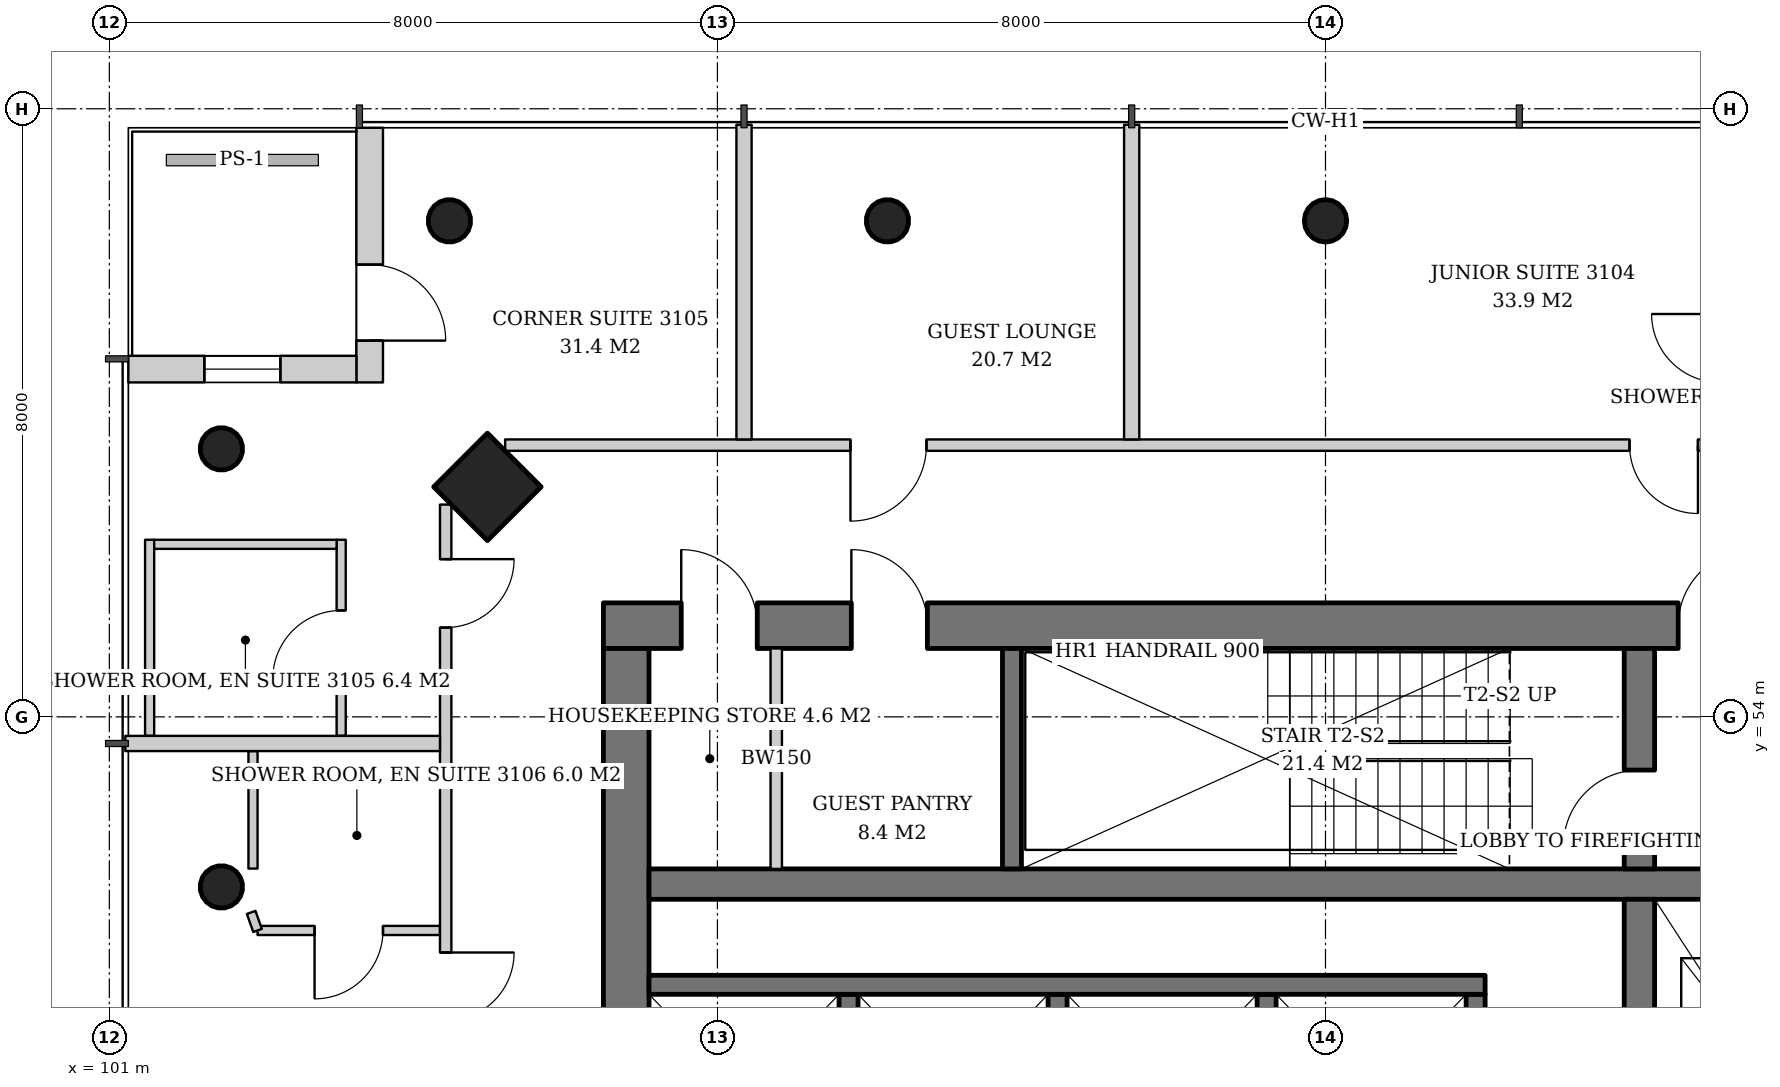
"""IFC4 building model, lengths in metres.
Left out: names, types, materials, properties, quantities, classifications, styles, units other than length and angle.
Written with IfcOpenShell. Run it as: python <this file> out.ifc"""

import sys

from ifc_helpers import new_model, si_unit, direction, frame, frame_2d, origin, origin_2d, place, context, subcontext, project, spatial, rectangle, hollow_circle, extrude, element, fill, save


model = new_model("IFC4")
c1 = context("Model", 3, precision=1e-05, world=origin(), true_north=direction((0.0, 1.0)))
c2 = subcontext(c1, "Body", "Model", "MODEL_VIEW")
j1 = project(units=[si_unit("LENGTHUNIT", "METRE"), si_unit("PLANEANGLEUNIT", "RADIAN")], contexts=[c1])
p1 = place(None, origin())
s1 = spatial("IfcSite", under=j1, at=p1, CompositionType="ELEMENT")
p2 = place(p1, origin())
s2 = spatial("IfcBuilding", under=s1, at=p2, CompositionType="ELEMENT")
p3 = place(p2, frame((0.0, 0.0, 123.6)))
s3 = spatial("IfcBuildingStorey", under=s2, at=p3, CompositionType="ELEMENT", Elevation=123.6)
p4 = place(p3, frame((105.922, 57.078, 0.0), z_axis=(0.043032401563, -0.043032401563, 0.998146494675), x_axis=(0.707106781187, 0.707106781187, 0.0)))
e1 = element("IfcColumn", 1, at=p4, inside=s3, PredefinedType="COLUMN", context=c2, shape_type="SweptSolid", body=[
    extrude(rectangle(XDim=1.0, YDim=1.0, at=origin_2d()), origin(), (0.0, 0.0, 1.0), 3.807),
])
p5 = place(p3, frame((105.422, 60.578, 0.0), z_axis=(0.043032401563, -0.043032401563, 0.998146494675), x_axis=(0.707106781187, 0.707106781187, 0.0)))
e2 = element("IfcColumn", 2, at=p5, inside=s3, PredefinedType="COLUMN", context=c2, shape_type="SweptSolid", body=[
    extrude(hollow_circle(Radius=0.28, WallThickness=0.02, at=origin_2d()), origin(), (0.0, 0.0, 1.0), 3.807),
])
p6 = place(p3, frame((117.0, 60.578, 0.0), z_axis=(0.0, -0.043072300418, 0.999071957837), x_axis=(1.0, 0.0, 0.0)))
e3 = element("IfcColumn", 3, at=p6, inside=s3, PredefinedType="COLUMN", context=c2, shape_type="SweptSolid", body=[
    extrude(hollow_circle(Radius=0.28, WallThickness=0.02, at=origin_2d()), origin(), (0.0, 0.0, 1.0), 3.803),
])
p7 = place(p3, frame((111.211, 60.578, 0.0), z_axis=(0.021563230905, -0.043062285527, 0.998839660125), x_axis=(0.894160516368, 0.44774654769, 0.0)))
e4 = element("IfcColumn", 4, at=p7, inside=s3, PredefinedType="COLUMN", context=c2, shape_type="SweptSolid", body=[
    extrude(hollow_circle(Radius=0.28, WallThickness=0.02, at=origin_2d()), origin(), (0.0, 0.0, 1.0), 3.804),
])
p8 = place(p3, frame((102.422, 57.578, 0.0), z_axis=(0.043032401563, -0.043032401563, 0.998146494675), x_axis=(0.707106781187, 0.707106781187, 0.0)))
e5 = element("IfcColumn", 5, at=p8, inside=s3, PredefinedType="COLUMN", context=c2, shape_type="SweptSolid", body=[
    extrude(hollow_circle(Radius=0.28, WallThickness=0.02, at=origin_2d()), origin(), (0.0, 0.0, 1.0), 3.807),
])
p9 = place(p3, frame((102.422, 51.789, 0.0), z_axis=(0.043062285527, -0.021563230905, 0.998839660125), x_axis=(0.44774654769, 0.894160516368, 0.0)))
e6 = element("IfcColumn", 6, at=p9, inside=s3, PredefinedType="COLUMN", context=c2, shape_type="SweptSolid", body=[
    extrude(hollow_circle(Radius=0.28, WallThickness=0.02, at=origin_2d()), origin(), (0.0, 0.0, 1.0), 3.804),
])
p10 = place(p3, frame((107.5, 55.2, 0.0), z_axis=(0.0, 0.0, 1.0), x_axis=(1.0, 0.0, 0.0)))
e7 = element("IfcWall", 7, at=p10, inside=s3, PredefinedType="SHEAR", context=c2, shape_type="SweptSolid", body=[
    extrude(rectangle(XDim=19.0, YDim=0.6, at=frame_2d((9.5, 0.0))), origin(), (0.0, 0.0, 1.0), 3.8),
])
p11 = place(p10, frame((14.14, 0.0, 0.0)))
e8 = element("IfcOpeningElement", 8, at=p11, cuts=e7, PredefinedType="OPENING", context=c2, shape_type="SweptSolid", body=[
    extrude(rectangle(XDim=1.0, YDim=2.1, at=frame_2d((0.5, 1.05))), frame((0.0, 0.31, 0.0), z_axis=(0.0, -1.0, 0.0), x_axis=(1.0, 0.0, 0.0)), (0.0, 0.0, 1.0), 0.62),
])
p12 = place(p10, frame((1.024, 0.0, 0.0)))
e9 = element("IfcOpeningElement", 9, at=p12, cuts=e7, PredefinedType="OPENING", context=c2, shape_type="SweptSolid", body=[
    extrude(rectangle(XDim=1.0, YDim=2.1, at=frame_2d((0.5, 1.05))), frame((0.0, 0.31, 0.0), z_axis=(0.0, -1.0, 0.0), x_axis=(1.0, 0.0, 0.0)), (0.0, 0.0, 1.0), 0.62),
])
p13 = place(p10, frame((3.262, 0.0, 0.0)))
e10 = element("IfcOpeningElement", 10, at=p13, cuts=e7, PredefinedType="OPENING", context=c2, shape_type="SweptSolid", body=[
    extrude(rectangle(XDim=1.0, YDim=2.1, at=frame_2d((0.5, 1.05))), frame((0.0, 0.31, 0.0), z_axis=(0.0, -1.0, 0.0), x_axis=(1.0, 0.0, 0.0)), (0.0, 0.0, 1.0), 0.62),
])
p14 = place(p3, frame((107.8, 37.1, 0.0), z_axis=(0.0, 0.0, 1.0), x_axis=(0.0, 1.0, 0.0)))
e11 = element("IfcWall", 11, at=p14, inside=s3, PredefinedType="SHEAR", context=c2, shape_type="SweptSolid", body=[
    extrude(rectangle(XDim=17.8, YDim=0.6, at=frame_2d((8.9, 0.0))), origin(), (0.0, 0.0, 1.0), 3.8),
])
p15 = place(p14, frame((8.0, 0.0, 0.0)))
e12 = element("IfcOpeningElement", 12, at=p15, cuts=e11, PredefinedType="OPENING", context=c2, shape_type="SweptSolid", body=[
    extrude(rectangle(XDim=1.8, YDim=2.4, at=frame_2d((0.9, 1.2))), frame((0.0, 0.31, 0.0), z_axis=(0.0, -1.0, 0.0), x_axis=(1.0, 0.0, 0.0)), (0.0, 0.0, 1.0), 0.62),
])
p16 = place(p3, frame((108.1, 51.8, 0.0), z_axis=(0.0, 0.0, 1.0), x_axis=(1.0, 0.0, 0.0)))
e13 = element("IfcWall", 13, at=p16, inside=s3, PredefinedType="SHEAR", context=c2, shape_type="SweptSolid", body=[
    extrude(rectangle(XDim=17.8, YDim=0.4, at=frame_2d((8.9, 0.0))), origin(), (0.0, 0.0, 1.0), 3.8),
])
p17 = place(p3, frame((121.13, 40.4, 0.0), z_axis=(0.0, 0.0, 1.0), x_axis=(0.0, 1.0, 0.0)))
e14 = element("IfcWall", 14, at=p17, inside=s3, PredefinedType="SHEAR", context=c2, shape_type="SweptSolid", body=[
    extrude(rectangle(XDim=11.2, YDim=0.4, at=frame_2d((5.6, 0.0))), origin(), (0.0, 0.0, 1.0), 3.8),
])
p18 = place(p3, frame((121.13, 52.0, 0.0), z_axis=(0.0, 0.0, 1.0), x_axis=(0.0, 1.0, 0.0)))
e15 = element("IfcWall", 15, at=p18, inside=s3, PredefinedType="SHEAR", context=c2, shape_type="SweptSolid", body=[
    extrude(rectangle(XDim=2.9, YDim=0.4, at=frame_2d((1.45, 0.0))), origin(), (0.0, 0.0, 1.0), 3.8),
])
p19 = place(p18, frame((0.3, 0.0, 0.0)))
e16 = element("IfcOpeningElement", 16, at=p19, cuts=e15, PredefinedType="OPENING", context=c2, shape_type="SweptSolid", body=[
    extrude(rectangle(XDim=1.0, YDim=2.1, at=frame_2d((0.5, 1.05))), frame((0.0, 0.21, 0.0), z_axis=(0.0, -1.0, 0.0), x_axis=(1.0, 0.0, 0.0)), (0.0, 0.0, 1.0), 0.42),
])
p20 = place(p3, frame((104.425, 61.75, 0.0), z_axis=(0.0, 0.0, 1.0), x_axis=(0.0, -1.0, 0.0)))
e17 = element("IfcWall", 17, at=p20, inside=s3, PredefinedType="SOLIDWALL", context=c2, shape_type="SweptSolid", body=[
    extrude(rectangle(XDim=3.35, YDim=0.35, at=frame_2d((1.675, 0.0))), origin(), (0.0, 0.0, 1.0), 3.6),
])
p21 = place(p20, frame((1.8, 0.0, 0.0)))
e18 = element("IfcOpeningElement", 18, at=p21, cuts=e17, PredefinedType="OPENING", context=c2, shape_type="SweptSolid", body=[
    extrude(rectangle(XDim=1.0, YDim=2.4, at=frame_2d((0.5, 1.2))), frame((0.0, 0.185, 0.0), z_axis=(0.0, -1.0, 0.0), x_axis=(1.0, 0.0, 0.0)), (0.0, 0.0, 1.0), 0.37),
])
p22 = place(p3, frame((104.25, 58.575, 0.0), z_axis=(0.0, 0.0, 1.0), x_axis=(-1.0, 0.0, 0.0)))
e19 = element("IfcWall", 19, at=p22, inside=s3, PredefinedType="SOLIDWALL", context=c2, shape_type="SweptSolid", body=[
    extrude(rectangle(XDim=3.0, YDim=0.35, at=frame_2d((1.5, 0.0))), origin(), (0.0, 0.0, 1.0), 3.6),
])
p23 = place(p22, frame((1.0, 0.0, 0.9)))
e20 = element("IfcOpeningElement", 20, at=p23, cuts=e19, PredefinedType="OPENING", context=c2, shape_type="SweptSolid", body=[
    extrude(rectangle(XDim=1.0, YDim=2.4, at=frame_2d((0.5, 1.2))), frame((0.0, 0.185, 0.0), z_axis=(0.0, -1.0, 0.0), x_axis=(1.0, 0.0, 0.0)), (0.0, 0.0, 1.0), 0.37),
])
p24 = place(p3, frame((112.875, 52.0, 0.0), z_axis=(0.0, 0.0, 1.0), x_axis=(0.0, 1.0, 0.0)))
e21 = element("IfcWall", 21, at=p24, inside=s3, PredefinedType="SHEAR", context=c2, shape_type="SweptSolid", body=[
    extrude(rectangle(XDim=2.9, YDim=0.25, at=frame_2d((1.45, 0.0))), origin(), (0.0, 0.0, 1.0), 3.8),
])
for number, where, z_axis, x_axis in (
    (22, (110.725, 47.75, 0.0), (0.0, 0.0, 1.0), (0.0, 1.0, 0.0)),
    (23, (113.475, 47.75, 0.0), (0.0, 0.0, 1.0), (0.0, 1.0, 0.0)),
    (24, (116.225, 47.75, 0.0), (0.0, 0.0, 1.0), (0.0, 1.0, 0.0)),
    (25, (118.975, 47.75, 0.0), (0.0, 0.0, 1.0), (0.0, 1.0, 0.0)),
):
    element("IfcWall", number, at=place(p3, frame(where, z_axis=z_axis, x_axis=x_axis)), inside=s3, PredefinedType="SHEAR", context=c2, shape_type="SweptSolid", body=[
        extrude(rectangle(XDim=2.6, YDim=0.25, at=frame_2d((1.3, 0.0))), origin(), (0.0, 0.0, 1.0), 3.8),
    ])
p25 = place(p3, frame((108.1, 50.475, 0.0), z_axis=(0.0, 0.0, 1.0), x_axis=(1.0, 0.0, 0.0)))
e26 = element("IfcWall", 26, at=p25, inside=s3, PredefinedType="SHEAR", context=c2, shape_type="SweptSolid", body=[
    extrude(rectangle(XDim=11.0, YDim=0.25, at=frame_2d((5.5, 0.0))), origin(), (0.0, 0.0, 1.0), 3.8),
])
p26 = place(p3, frame((109.774, 52.0, 0.0), z_axis=(0.0, 0.0, 1.0), x_axis=(0.0, 1.0, 0.0)))
e27 = element("IfcWall", 27, at=p26, inside=s3, PredefinedType="SOLIDWALL", context=c2, shape_type="SweptSolid", body=[
    extrude(rectangle(XDim=2.9, YDim=0.15, at=frame_2d((1.45, 0.0))), origin(), (0.0, 0.0, 1.0), 3.6),
])
p27 = place(p3, frame((127.793, 57.575, 0.0), z_axis=(0.0, 0.0, 1.0), x_axis=(-1.0, 0.0, 0.0)))
e28 = element("IfcWall", 28, at=p27, inside=s3, PredefinedType="PARTITIONING", context=c2, shape_type="SweptSolid", body=[
    extrude(rectangle(XDim=21.586, YDim=0.15, at=frame_2d((10.793, 0.0))), origin(), (0.0, 0.0, 1.0), 2.9),
])
p28 = place(p27, frame((0.718, 0.0, 0.0)))
e29 = element("IfcOpeningElement", 29, at=p28, cuts=e28, PredefinedType="OPENING", context=c2, shape_type="SweptSolid", body=[
    extrude(rectangle(XDim=0.9, YDim=2.1, at=frame_2d((0.45, 1.05))), frame((0.0, 0.085, 0.0), z_axis=(0.0, -1.0, 0.0), x_axis=(1.0, 0.0, 0.0)), (0.0, 0.0, 1.0), 0.17),
])
p29 = place(p27, frame((5.893, 0.0, 0.0)))
e30 = element("IfcOpeningElement", 30, at=p29, cuts=e28, PredefinedType="OPENING", context=c2, shape_type="SweptSolid", body=[
    extrude(rectangle(XDim=0.9, YDim=2.1, at=frame_2d((0.45, 1.05))), frame((0.0, 0.085, 0.0), z_axis=(0.0, -1.0, 0.0), x_axis=(1.0, 0.0, 0.0)), (0.0, 0.0, 1.0), 0.17),
])
p30 = place(p27, frame((16.043, 0.0, 0.0)))
e31 = element("IfcOpeningElement", 31, at=p30, cuts=e28, PredefinedType="OPENING", context=c2, shape_type="SweptSolid", body=[
    extrude(rectangle(XDim=1.0, YDim=2.1, at=frame_2d((0.5, 1.05))), frame((0.0, 0.085, 0.0), z_axis=(0.0, -1.0, 0.0), x_axis=(1.0, 0.0, 0.0)), (0.0, 0.0, 1.0), 0.17),
])
p31 = place(p3, frame((114.45, 57.65, 0.0), z_axis=(0.0, 0.0, 1.0), x_axis=(0.0, 1.0, 0.0)))
e32 = element("IfcWall", 32, at=p31, inside=s3, PredefinedType="PARTITIONING", context=c2, shape_type="SweptSolid", body=[
    extrude(rectangle(XDim=4.14, YDim=0.2, at=frame_2d((2.07, 0.0))), origin(), (0.0, 0.0, 1.0), 3.0),
])
p32 = place(p3, frame((109.35, 57.65, 0.0), z_axis=(0.0, 0.0, 1.0), x_axis=(0.0, 1.0, 0.0)))
e33 = element("IfcWall", 33, at=p32, inside=s3, PredefinedType="PARTITIONING", context=c2, shape_type="SweptSolid", body=[
    extrude(rectangle(XDim=4.14, YDim=0.2, at=frame_2d((2.07, 0.0))), origin(), (0.0, 0.0, 1.0), 3.2),
])
p33 = place(p3, frame((104.05, 53.75, 0.0), z_axis=(0.0, 0.0, 1.0), x_axis=(0.0, 1.0, 0.0)))
e34 = element("IfcWall", 34, at=p33, inside=s3, PredefinedType="PARTITIONING", context=c2, shape_type="SweptSolid", body=[
    extrude(rectangle(XDim=2.58, YDim=0.12, at=frame_2d((1.29, 0.0))), origin(), (0.0, 0.0, 1.0), 2.9),
])
p34 = place(p33, frame((0.75, 0.0, 0.0)))
e35 = element("IfcOpeningElement", 35, at=p34, cuts=e34, PredefinedType="OPENING", context=c2, shape_type="SweptSolid", body=[
    extrude(rectangle(XDim=0.9, YDim=2.1, at=frame_2d((0.45, 1.05))), frame((0.0, 0.07, 0.0), z_axis=(0.0, -1.0, 0.0), x_axis=(1.0, 0.0, 0.0)), (0.0, 0.0, 1.0), 0.14),
])
p35 = place(p3, frame((101.53, 53.75, 0.0), z_axis=(0.0, 0.0, 1.0), x_axis=(0.0, 1.0, 0.0)))
e36 = element("IfcWall", 36, at=p35, inside=s3, PredefinedType="PARTITIONING", context=c2, shape_type="SweptSolid", body=[
    extrude(rectangle(XDim=2.58, YDim=0.12, at=frame_2d((1.29, 0.0))), origin(), (0.0, 0.0, 1.0), 3.6),
])
p36 = place(p3, frame((103.99, 56.27, 0.0), z_axis=(0.0, 0.0, 1.0), x_axis=(-1.0, 0.0, 0.0)))
e37 = element("IfcWall", 37, at=p36, inside=s3, PredefinedType="PARTITIONING", context=c2, shape_type="SweptSolid", body=[
    extrude(rectangle(XDim=2.4, YDim=0.12, at=frame_2d((1.2, 0.0))), origin(), (0.0, 0.0, 1.0), 3.2),
])
p37 = place(p3, frame((102.89, 53.55, 0.0), z_axis=(0.0, 0.0, 1.0), x_axis=(0.0, -1.0, 0.0)))
e38 = element("IfcWall", 38, at=p37, inside=s3, PredefinedType="PARTITIONING", context=c2, shape_type="SweptSolid", body=[
    extrude(rectangle(XDim=1.546, YDim=0.12, at=frame_2d((0.773, 0.0))), origin(), (0.0, 0.0, 1.0), 3.6),
])
p38 = place(p3, frame((105.35, 51.19, 0.0), z_axis=(0.0, 0.0, 1.0), x_axis=(-1.0, 0.0, 0.0)))
e39 = element("IfcWall", 39, at=p38, inside=s3, PredefinedType="PARTITIONING", context=c2, shape_type="SweptSolid", body=[
    extrude(rectangle(XDim=2.4, YDim=0.12, at=frame_2d((1.2, 0.0))), origin(), (0.0, 0.0, 1.0), 2.65),
])
p39 = place(p38, frame((0.75, 0.0, 0.0)))
e40 = element("IfcOpeningElement", 40, at=p39, cuts=e39, PredefinedType="OPENING", context=c2, shape_type="SweptSolid", body=[
    extrude(rectangle(XDim=0.9, YDim=2.1, at=frame_2d((0.45, 1.05))), frame((0.0, 0.07, 0.0), z_axis=(0.0, -1.0, 0.0), x_axis=(1.0, 0.0, 0.0)), (0.0, 0.0, 1.0), 0.14),
])
p40 = place(p3, frame((105.425, 56.793, 0.0), z_axis=(0.0, 0.0, 1.0), x_axis=(0.0, -1.0, 0.0)))
e41 = element("IfcWall", 41, at=p40, inside=s3, PredefinedType="PARTITIONING", context=c2, shape_type="SweptSolid", body=[
    extrude(rectangle(XDim=21.586, YDim=0.15, at=frame_2d((10.793, 0.0))), origin(), (0.0, 0.0, 1.0), 2.9),
])
p41 = place(p40, frame((0.718, 0.0, 0.0)))
e42 = element("IfcOpeningElement", 42, at=p41, cuts=e41, PredefinedType="OPENING", context=c2, shape_type="SweptSolid", body=[
    extrude(rectangle(XDim=0.9, YDim=2.1, at=frame_2d((0.45, 1.05))), frame((0.0, 0.085, 0.0), z_axis=(0.0, -1.0, 0.0), x_axis=(1.0, 0.0, 0.0)), (0.0, 0.0, 1.0), 0.17),
])
p42 = place(p40, frame((5.893, 0.0, 0.0)))
e43 = element("IfcOpeningElement", 43, at=p42, cuts=e41, PredefinedType="OPENING", context=c2, shape_type="SweptSolid", body=[
    extrude(rectangle(XDim=0.9, YDim=2.1, at=frame_2d((0.45, 1.05))), frame((0.0, 0.085, 0.0), z_axis=(0.0, -1.0, 0.0), x_axis=(1.0, 0.0, 0.0)), (0.0, 0.0, 1.0), 0.17),
])
p43 = place(p40, frame((16.043, 0.0, 0.0)))
e44 = element("IfcOpeningElement", 44, at=p43, cuts=e41, PredefinedType="OPENING", context=c2, shape_type="SweptSolid", body=[
    extrude(rectangle(XDim=1.0, YDim=2.1, at=frame_2d((0.5, 1.05))), frame((0.0, 0.085, 0.0), z_axis=(0.0, -1.0, 0.0), x_axis=(1.0, 0.0, 0.0)), (0.0, 0.0, 1.0), 0.17),
])
p44 = place(p3, frame((105.35, 53.65, 0.0), z_axis=(0.0, 0.0, 1.0), x_axis=(-1.0, 0.0, 0.0)))
e45 = element("IfcWall", 45, at=p44, inside=s3, PredefinedType="PARTITIONING", context=c2, shape_type="SweptSolid", body=[
    extrude(rectangle(XDim=4.14, YDim=0.2, at=frame_2d((2.07, 0.0))), origin(), (0.0, 0.0, 1.0), 3.2),
])
p45 = place(p3, frame((102.95, 51.19, 0.0), z_axis=(0.0, 0.0, 1.0), x_axis=(-0.33418781393, 0.942506501315, 0.0)))
e46 = element("IfcWall", 46, at=p45, inside=s3, PredefinedType="PARTITIONING", context=c2, shape_type="SweptSolid", body=[
    extrude(rectangle(XDim=0.252, YDim=0.12, at=frame_2d((0.126, 0.0))), origin(), (0.0, 0.0, 1.0), 2.65),
])
p46 = place(p21, origin())
e47 = element("IfcDoor", 47, at=p46, inside=s3, OperationType="SINGLE_SWING_RIGHT", PredefinedType="DOOR", context=c2, shape_type="SweptSolid", body=[
    extrude(rectangle(XDim=1.0, YDim=2.4, at=frame_2d((0.5, 1.2))), frame((0.0, 0.025, 0.0), z_axis=(0.0, -1.0, 0.0), x_axis=(1.0, 0.0, 0.0)), (0.0, 0.0, 1.0), 0.05),
])
fill(e18, e47)
p47 = place(p23, origin())
e48 = element("IfcWindow", 48, at=p47, inside=s3, PartitioningType="SINGLE_PANEL", PredefinedType="WINDOW", context=c2, shape_type="SweptSolid", body=[
    extrude(rectangle(XDim=1.0, YDim=2.4, at=frame_2d((0.5, 1.2))), frame((0.0, 0.03, 0.0), z_axis=(0.0, -1.0, 0.0), x_axis=(1.0, 0.0, 0.0)), (0.0, 0.0, 1.0), 0.06),
])
fill(e20, e48)
p48 = place(p19, origin())
e49 = element("IfcDoor", 49, at=p48, inside=s3, OperationType="SINGLE_SWING_LEFT", PredefinedType="DOOR", context=c2, shape_type="SweptSolid", body=[
    extrude(rectangle(XDim=1.0, YDim=2.1, at=frame_2d((0.5, 1.05))), frame((0.0, 0.025, 0.0), z_axis=(0.0, -1.0, 0.0), x_axis=(1.0, 0.0, 0.0)), (0.0, 0.0, 1.0), 0.05),
])
fill(e16, e49)
p49 = place(p11, origin())
e50 = element("IfcDoor", 50, at=p49, inside=s3, OperationType="SINGLE_SWING_RIGHT", PredefinedType="DOOR", context=c2, shape_type="SweptSolid", body=[
    extrude(rectangle(XDim=1.0, YDim=2.1, at=frame_2d((0.5, 1.05))), frame((0.0, 0.025, 0.0), z_axis=(0.0, -1.0, 0.0), x_axis=(1.0, 0.0, 0.0)), (0.0, 0.0, 1.0), 0.05),
])
fill(e8, e50)
p50 = place(p12, origin())
e51 = element("IfcDoor", 51, at=p50, inside=s3, OperationType="SINGLE_SWING_LEFT", PredefinedType="DOOR", context=c2, shape_type="SweptSolid", body=[
    extrude(rectangle(XDim=1.0, YDim=2.1, at=frame_2d((0.5, 1.05))), frame((0.0, -0.24, 0.0), z_axis=(0.0, -1.0, 0.0), x_axis=(1.0, 0.0, 0.0)), (0.0, 0.0, 1.0), 0.05),
])
fill(e9, e51)
p51 = place(p13, origin())
e52 = element("IfcDoor", 52, at=p51, inside=s3, OperationType="SINGLE_SWING_LEFT", PredefinedType="DOOR", context=c2, shape_type="SweptSolid", body=[
    extrude(rectangle(XDim=1.0, YDim=2.1, at=frame_2d((0.5, 1.05))), frame((0.0, -0.24, 0.0), z_axis=(0.0, -1.0, 0.0), x_axis=(1.0, 0.0, 0.0)), (0.0, 0.0, 1.0), 0.05),
])
fill(e10, e52)
p52 = place(p29, origin())
e53 = element("IfcDoor", 53, at=p52, inside=s3, OperationType="SINGLE_SWING_LEFT", PredefinedType="DOOR", context=c2, shape_type="SweptSolid", body=[
    extrude(rectangle(XDim=0.9, YDim=2.1, at=frame_2d((0.45, 1.05))), frame((0.0, 0.025, 0.0), z_axis=(0.0, -1.0, 0.0), x_axis=(1.0, 0.0, 0.0)), (0.0, 0.0, 1.0), 0.05),
])
fill(e30, e53)
p53 = place(p30, origin())
e54 = element("IfcDoor", 54, at=p53, inside=s3, OperationType="SINGLE_SWING_RIGHT", PredefinedType="DOOR", context=c2, shape_type="SweptSolid", body=[
    extrude(rectangle(XDim=1.0, YDim=2.1, at=frame_2d((0.5, 1.05))), frame((0.0, 0.025, 0.0), z_axis=(0.0, -1.0, 0.0), x_axis=(1.0, 0.0, 0.0)), (0.0, 0.0, 1.0), 0.05),
])
fill(e31, e54)
p54 = place(p34, origin())
e55 = element("IfcDoor", 55, at=p54, inside=s3, OperationType="SINGLE_SWING_LEFT", PredefinedType="DOOR", context=c2, shape_type="SweptSolid", body=[
    extrude(rectangle(XDim=0.9, YDim=2.1, at=frame_2d((0.45, 1.05))), frame((0.0, 0.025, 0.0), z_axis=(0.0, -1.0, 0.0), x_axis=(1.0, 0.0, 0.0)), (0.0, 0.0, 1.0), 0.05),
])
fill(e35, e55)
p55 = place(p39, origin())
e56 = element("IfcDoor", 56, at=p55, inside=s3, OperationType="SINGLE_SWING_RIGHT", PredefinedType="DOOR", context=c2, shape_type="SweptSolid", body=[
    extrude(rectangle(XDim=0.9, YDim=2.1, at=frame_2d((0.45, 1.05))), frame((0.0, 0.025, 0.0), z_axis=(0.0, -1.0, 0.0), x_axis=(1.0, 0.0, 0.0)), (0.0, 0.0, 1.0), 0.05),
])
fill(e40, e56)
p56 = place(p41, origin())
e57 = element("IfcDoor", 57, at=p56, inside=s3, OperationType="SINGLE_SWING_LEFT", PredefinedType="DOOR", context=c2, shape_type="SweptSolid", body=[
    extrude(rectangle(XDim=0.9, YDim=2.1, at=frame_2d((0.45, 1.05))), frame((0.0, 0.025, 0.0), z_axis=(0.0, -1.0, 0.0), x_axis=(1.0, 0.0, 0.0)), (0.0, 0.0, 1.0), 0.05),
])
fill(e42, e57)
p57 = place(p42, origin())
e58 = element("IfcDoor", 58, at=p57, inside=s3, OperationType="SINGLE_SWING_LEFT", PredefinedType="DOOR", context=c2, shape_type="SweptSolid", body=[
    extrude(rectangle(XDim=0.9, YDim=2.1, at=frame_2d((0.45, 1.05))), frame((0.0, 0.025, 0.0), z_axis=(0.0, -1.0, 0.0), x_axis=(1.0, 0.0, 0.0)), (0.0, 0.0, 1.0), 0.05),
])
fill(e43, e58)
save(model, sys.argv[1])
